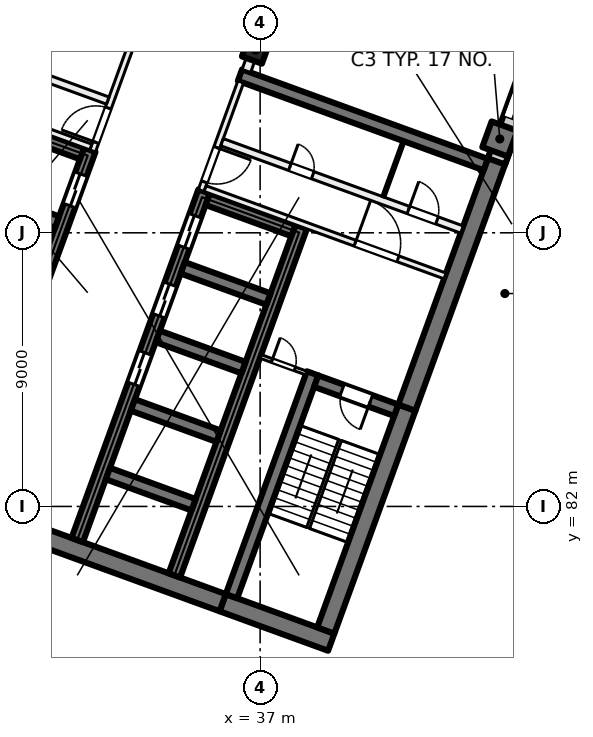
"""IFC4 building model, lengths in metres.
Left out: names, types, materials, properties, quantities, classifications, styles, units other than length and angle.
Written with IfcOpenShell. Run it as: python <this file> out.ifc"""

import sys

from ifc_helpers import new_model, si_unit, direction, frame, frame_2d, origin, origin_2d, place, context, subcontext, project, spatial, rectangle, extrude, element, fill, save


model = new_model("IFC4")
c1 = context("Model", 3, precision=1e-05, world=origin(), true_north=direction((0.0, 1.0)))
c2 = subcontext(c1, "Body", "Model", "MODEL_VIEW")
j1 = project(units=[si_unit("LENGTHUNIT", "METRE"), si_unit("PLANEANGLEUNIT", "RADIAN")], contexts=[c1])
p1 = place(None, origin())
s1 = spatial("IfcSite", under=j1, at=p1, CompositionType="ELEMENT")
p2 = place(p1, origin())
s2 = spatial("IfcBuilding", under=s1, at=p2, CompositionType="ELEMENT")
p3 = place(p2, frame((0.0, 0.0, 59.5)))
s3 = spatial("IfcBuildingStorey", under=s2, at=p3, CompositionType="ELEMENT", Elevation=59.5)
p4 = place(p3, frame((36.849, 97.011, 0.0), z_axis=(0.0, 0.0, 1.0), x_axis=(-0.342020143326, -0.939692620786, 0.0)))
e1 = element("IfcColumn", 1, at=p4, inside=s3, PredefinedType="COLUMN", context=c2, shape_type="SweptSolid", body=[
    extrude(rectangle(XDim=0.7, YDim=0.7, at=origin_2d()), origin(), (0.0, 0.0, 1.0), 4.0),
])
p5 = place(p3, frame((44.884, 94.087, 0.0), z_axis=(0.0, 0.0, 1.0), x_axis=(-0.342020143326, -0.939692620786, 0.0)))
e2 = element("IfcColumn", 2, at=p5, inside=s3, PredefinedType="COLUMN", context=c2, shape_type="SweptSolid", body=[
    extrude(rectangle(XDim=0.9, YDim=0.9, at=origin_2d()), origin(), (0.0, 0.0, 1.0), 4.0),
])
p6 = place(p3, frame((39.338, 77.535, 0.0), z_axis=(0.0, 0.0, 1.0), x_axis=(-0.939701471648, 0.341995824804, 0.0)))
e3 = element("IfcWall", 3, at=p6, inside=s3, PredefinedType="SHEAR", context=c2, shape_type="SweptSolid", body=[
    extrude(rectangle(XDim=3.8, YDim=0.6, at=frame_2d((1.9, 0.0))), origin(), (0.0, 0.0, 1.0), 4.0),
])
p7 = place(p3, frame((35.767, 78.835, 0.0), z_axis=(0.0, 0.0, 1.0), x_axis=(-0.939692894512, 0.342019391267, 0.0)))
e4 = element("IfcWall", 4, at=p7, inside=s3, PredefinedType="SHEAR", context=c2, shape_type="SweptSolid", body=[
    extrude(rectangle(XDim=14.4, YDim=0.6, at=frame_2d((7.2, 0.0))), origin(), (0.0, 0.0, 1.0), 4.0),
])
p8 = place(p3, frame((39.159, 77.92, 0.0), z_axis=(0.0, 0.0, 1.0), x_axis=(0.342016982193, 0.939693771338, 0.0)))
e5 = element("IfcWall", 5, at=p8, inside=s3, PredefinedType="SHEAR", context=c2, shape_type="SweptSolid", body=[
    extrude(rectangle(XDim=7.8, YDim=0.6, at=frame_2d((3.9, 0.0))), origin(), (0.0, 0.0, 1.0), 4.0),
])
p9 = place(p3, frame((41.827, 85.249, 0.0), z_axis=(0.0, 0.0, 1.0), x_axis=(0.342016162452, 0.939694069696, 0.0)))
e6 = element("IfcWall", 6, at=p9, inside=s3, PredefinedType="SHEAR", context=c2, shape_type="SweptSolid", body=[
    extrude(rectangle(XDim=8.9, YDim=0.6, at=frame_2d((4.45, 0.0))), origin(), (0.0, 0.0, 1.0), 4.0),
])
p10 = place(p3, frame((36.058, 79.048, 0.0), z_axis=(0.0, 0.0, 1.0), x_axis=(0.342016982193, 0.939693771338, 0.0)))
e7 = element("IfcWall", 7, at=p10, inside=s3, PredefinedType="SHEAR", context=c2, shape_type="SweptSolid", body=[
    extrude(rectangle(XDim=7.8, YDim=0.4, at=frame_2d((3.9, 0.0))), origin(), (0.0, 0.0, 1.0), 4.0),
])
p11 = place(p3, frame((41.476, 85.164, 0.0), z_axis=(0.0, 0.0, 1.0), x_axis=(-0.939678810556, 0.342058084236, 0.0)))
e8 = element("IfcWall", 8, at=p11, inside=s3, PredefinedType="SHEAR", context=c2, shape_type="SweptSolid", body=[
    extrude(rectangle(XDim=2.8, YDim=0.4, at=frame_2d((1.4, 0.0))), origin(), (0.0, 0.0, 1.0), 4.0),
])
p12 = place(p11, frame((0.9, 0.0, 0.0)))
e9 = element("IfcOpeningElement", 9, at=p12, cuts=e8, PredefinedType="OPENING", context=c2, shape_type="SweptSolid", body=[
    extrude(rectangle(XDim=1.0, YDim=2.1, at=frame_2d((0.5, 1.05))), frame((0.0, 0.21, 0.0), z_axis=(0.0, -1.0, 0.0), x_axis=(1.0, 0.0, 0.0)), (0.0, 0.0, 1.0), 0.42),
])
p13 = place(p3, frame((30.984, 80.895, 0.0), z_axis=(0.0, 0.0, 1.0), x_axis=(0.342021021735, 0.939692301071, 0.0)))
e10 = element("IfcWall", 10, at=p13, inside=s3, PredefinedType="SHEAR", context=c2, shape_type="SweptSolid", body=[
    extrude(rectangle(XDim=12.2, YDim=0.4, at=frame_2d((6.1, 0.0))), origin(), (0.0, 0.0, 1.0), 4.0),
])
p14 = place(p13, frame((5.45, 0.0, 0.0)))
e11 = element("IfcOpeningElement", 11, at=p14, cuts=e10, PredefinedType="OPENING", context=c2, shape_type="SweptSolid", body=[
    extrude(rectangle(XDim=1.1, YDim=2.1, at=frame_2d((0.55, 1.05))), frame((0.0, 0.21, 0.0), z_axis=(0.0, -1.0, 0.0), x_axis=(1.0, 0.0, 0.0)), (0.0, 0.0, 1.0), 0.42),
])
p15 = place(p13, frame((7.85, 0.0, 0.0)))
e12 = element("IfcOpeningElement", 12, at=p15, cuts=e10, PredefinedType="OPENING", context=c2, shape_type="SweptSolid", body=[
    extrude(rectangle(XDim=1.1, YDim=2.1, at=frame_2d((0.55, 1.05))), frame((0.0, 0.21, 0.0), z_axis=(0.0, -1.0, 0.0), x_axis=(1.0, 0.0, 0.0)), (0.0, 0.0, 1.0), 0.42),
])
p16 = place(p13, frame((10.25, 0.0, 0.0)))
e13 = element("IfcOpeningElement", 13, at=p16, cuts=e10, PredefinedType="OPENING", context=c2, shape_type="SweptSolid", body=[
    extrude(rectangle(XDim=1.1, YDim=2.1, at=frame_2d((0.55, 1.05))), frame((0.0, 0.21, 0.0), z_axis=(0.0, -1.0, 0.0), x_axis=(1.0, 0.0, 0.0)), (0.0, 0.0, 1.0), 0.42),
])
p17 = place(p3, frame((34.178, 79.732, 0.0), z_axis=(0.0, 0.0, 1.0), x_axis=(0.342014590177, 0.939694641948, 0.0)))
e14 = element("IfcWall", 14, at=p17, inside=s3, PredefinedType="SHEAR", context=c2, shape_type="SweptSolid", body=[
    extrude(rectangle(XDim=12.2, YDim=0.4, at=frame_2d((6.1, 0.0))), origin(), (0.0, 0.0, 1.0), 4.0),
])
for number, where, z_axis, x_axis in (
    (15, (34.812, 82.056, 0.0), (0.0, 0.0, 1.0), (-0.94, 0.342, 0.0)),
    (16, (35.632, 84.311, 0.0), (0.0, 0.0, 1.0), (-0.94, 0.342, 0.0)),
    (17, (36.453, 86.566, 0.0), (0.0, 0.0, 1.0), (-0.94, 0.342, 0.0)),
    (18, (37.274, 88.822, 0.0), (0.0, 0.0, 1.0), (-0.94, 0.342, 0.0)),
):
    element("IfcWall", number, at=place(p3, frame(where, z_axis=z_axis, x_axis=x_axis)), inside=s3, PredefinedType="SHEAR", context=c2, shape_type="SweptSolid", body=[
        extrude(rectangle(XDim=3.0, YDim=0.4, at=frame_2d((1.5, 0.0))), origin(), (0.0, 0.0, 1.0), 4.0),
    ])
p18 = place(p3, frame((38.095, 91.077, 0.0), z_axis=(0.0, 0.0, 1.0), x_axis=(-0.939676934218, 0.342063238742, 0.0)))
e19 = element("IfcWall", 19, at=p18, inside=s3, PredefinedType="SHEAR", context=c2, shape_type="SweptSolid", body=[
    extrude(rectangle(XDim=3.0, YDim=0.4, at=frame_2d((1.5, 0.0))), origin(), (0.0, 0.0, 1.0), 4.0),
])
p19 = place(p3, frame((27.225, 82.263, 0.0), z_axis=(0.0, 0.0, 1.0), x_axis=(0.342014590177, 0.939694641948, 0.0)))
e20 = element("IfcWall", 20, at=p19, inside=s3, PredefinedType="SHEAR", context=c2, shape_type="SweptSolid", body=[
    extrude(rectangle(XDim=12.2, YDim=0.4, at=frame_2d((6.1, 0.0))), origin(), (0.0, 0.0, 1.0), 4.0),
])
p20 = place(p19, frame((10.25, 0.0, 0.0)))
e21 = element("IfcOpeningElement", 21, at=p20, cuts=e20, PredefinedType="OPENING", context=c2, shape_type="SweptSolid", body=[
    extrude(rectangle(XDim=1.1, YDim=2.1, at=frame_2d((0.55, 1.05))), frame((0.0, 0.21, 0.0), z_axis=(0.0, -1.0, 0.0), x_axis=(1.0, 0.0, 0.0)), (0.0, 0.0, 1.0), 0.42),
])
p21 = place(p19, frame((0.7, 0.0, 0.0)))
e22 = element("IfcOpeningElement", 22, at=p21, cuts=e20, PredefinedType="OPENING", context=c2, shape_type="SweptSolid", body=[
    extrude(rectangle(XDim=0.8, YDim=2.1, at=frame_2d((0.4, 1.05))), frame((0.0, 0.21, 0.0), z_axis=(0.0, -1.0, 0.0), x_axis=(1.0, 0.0, 0.0)), (0.0, 0.0, 1.0), 0.42),
])
for number, where, z_axis, x_axis in (
    (23, (30.32, 91.353, 0.0), (0.0, 0.0, 1.0), (-0.94, 0.342, 0.0)),
    (24, (31.141, 93.608, 0.0), (0.0, 0.0, 1.0), (-0.94, 0.342, 0.0)),
):
    element("IfcWall", number, at=place(p3, frame(where, z_axis=z_axis, x_axis=x_axis)), inside=s3, PredefinedType="SHEAR", context=c2, shape_type="SweptSolid", body=[
        extrude(rectangle(XDim=3.0, YDim=0.4, at=frame_2d((1.5, 0.0))), origin(), (0.0, 0.0, 1.0), 4.0),
    ])
p22 = place(p3, frame((44.418, 93.245, 0.0), z_axis=(0.0, 0.0, 1.0), x_axis=(-0.93969060187, 0.342025690201, 0.0)))
e25 = element("IfcWall", 25, at=p22, inside=s3, PredefinedType="SHEAR", context=c2, shape_type="SweptSolid", body=[
    extrude(rectangle(XDim=8.6, YDim=0.4, at=frame_2d((4.3, 0.0))), origin(), (0.0, 0.0, 1.0), 4.0),
])
p23 = place(p3, frame((52.212, 113.783, 0.0), z_axis=(0.0, 0.0, 1.0), x_axis=(-0.34202521188, -0.939690775968, 0.0)))
e26 = element("IfcWall", 26, at=p23, inside=s3, PredefinedType="SOLIDWALL", context=c2, shape_type="SweptSolid", body=[
    extrude(rectangle(XDim=21.745, YDim=0.6, at=frame_2d((10.873, 0.0))), origin(), (0.0, 0.0, 1.0), 3.625),
])
p24 = place(p23, frame((3.765, 0.0, 0.9)))
e27 = element("IfcOpeningElement", 27, at=p24, cuts=e26, PredefinedType="OPENING", context=c2, shape_type="SweptSolid", body=[
    extrude(rectangle(XDim=3.0, YDim=2.4, at=frame_2d((1.5, 1.2))), frame((0.0, 0.31, 0.0), z_axis=(0.0, -1.0, 0.0), x_axis=(1.0, 0.0, 0.0)), (0.0, 0.0, 1.0), 0.62),
])
p25 = place(p23, frame((8.265, 0.0, 0.9)))
e28 = element("IfcOpeningElement", 28, at=p25, cuts=e26, PredefinedType="OPENING", context=c2, shape_type="SweptSolid", body=[
    extrude(rectangle(XDim=3.0, YDim=2.4, at=frame_2d((1.5, 1.2))), frame((0.0, 0.31, 0.0), z_axis=(0.0, -1.0, 0.0), x_axis=(1.0, 0.0, 0.0)), (0.0, 0.0, 1.0), 0.62),
])
p26 = place(p23, frame((12.765, 0.0, 0.9)))
e29 = element("IfcOpeningElement", 29, at=p26, cuts=e26, PredefinedType="OPENING", context=c2, shape_type="SweptSolid", body=[
    extrude(rectangle(XDim=3.0, YDim=2.4, at=frame_2d((1.5, 1.2))), frame((0.0, 0.31, 0.0), z_axis=(0.0, -1.0, 0.0), x_axis=(1.0, 0.0, 0.0)), (0.0, 0.0, 1.0), 0.62),
])
p27 = place(p23, frame((17.265, 0.0, 0.9)))
e30 = element("IfcOpeningElement", 30, at=p27, cuts=e26, PredefinedType="OPENING", context=c2, shape_type="SweptSolid", body=[
    extrude(rectangle(XDim=3.0, YDim=2.4, at=frame_2d((1.5, 1.2))), frame((0.0, 0.31, 0.0), z_axis=(0.0, -1.0, 0.0), x_axis=(1.0, 0.0, 0.0)), (0.0, 0.0, 1.0), 0.62),
])
p28 = place(p3, frame((31.491, 93.693, 0.0), z_axis=(0.0, 0.0, 1.0), x_axis=(0.341995824804, 0.939701471648, 0.0)))
e31 = element("IfcWall", 31, at=p28, inside=s3, PredefinedType="PARTITIONING", context=c2, shape_type="SweptSolid", body=[
    extrude(rectangle(XDim=3.8, YDim=0.2, at=frame_2d((1.9, 0.0))), origin(), (0.0, 0.0, 1.0), 3.625),
])
p29 = place(p28, frame((0.3, 0.0, 0.0)))
e32 = element("IfcOpeningElement", 32, at=p29, cuts=e31, PredefinedType="OPENING", context=c2, shape_type="SweptSolid", body=[
    extrude(rectangle(XDim=1.2, YDim=2.1, at=frame_2d((0.6, 1.05))), frame((0.0, 0.11, 0.0), z_axis=(0.0, -1.0, 0.0), x_axis=(1.0, 0.0, 0.0)), (0.0, 0.0, 1.0), 0.22),
])
p30 = place(p3, frame((23.538, 96.694, 0.0), z_axis=(0.0, 0.0, 1.0), x_axis=(0.939691552312, -0.342023078919, 0.0)))
e33 = element("IfcWall", 33, at=p30, inside=s3, PredefinedType="PARTITIONING", context=c2, shape_type="SweptSolid", body=[
    extrude(rectangle(XDim=8.4, YDim=0.2, at=frame_2d((4.2, 0.0))), origin(), (0.0, 0.0, 1.0), 3.625),
])
p31 = place(p30, frame((1.65, 0.0, 0.0)))
e34 = element("IfcOpeningElement", 34, at=p31, cuts=e33, PredefinedType="OPENING", context=c2, shape_type="SweptSolid", body=[
    extrude(rectangle(XDim=1.5, YDim=2.1, at=frame_2d((0.75, 1.05))), frame((0.0, 0.11, 0.0), z_axis=(0.0, -1.0, 0.0), x_axis=(1.0, 0.0, 0.0)), (0.0, 0.0, 1.0), 0.22),
])
p32 = place(p3, frame((24.094, 98.221, 0.0), z_axis=(0.0, 0.0, 1.0), x_axis=(0.939691552312, -0.342023078919, 0.0)))
e35 = element("IfcWall", 35, at=p32, inside=s3, PredefinedType="PARTITIONING", context=c2, shape_type="SweptSolid", body=[
    extrude(rectangle(XDim=8.4, YDim=0.25, at=frame_2d((4.2, 0.0))), origin(), (0.0, 0.0, 1.0), 3.625),
])
p33 = place(p32, frame((3.7, 0.0, 0.0)))
e36 = element("IfcOpeningElement", 36, at=p33, cuts=e35, PredefinedType="OPENING", context=c2, shape_type="SweptSolid", body=[
    extrude(rectangle(XDim=1.0, YDim=2.1, at=frame_2d((0.5, 1.05))), frame((0.0, 0.135, 0.0), z_axis=(0.0, -1.0, 0.0), x_axis=(1.0, 0.0, 0.0)), (0.0, 0.0, 1.0), 0.27),
])
p34 = place(p3, frame((36.362, 95.964, 0.0), z_axis=(0.0, 0.0, 1.0), x_axis=(-0.341995824804, -0.939701471648, 0.0)))
e37 = element("IfcWall", 37, at=p34, inside=s3, PredefinedType="PARTITIONING", context=c2, shape_type="SweptSolid", body=[
    extrude(rectangle(XDim=3.8, YDim=0.2, at=frame_2d((1.9, 0.0))), origin(), (0.0, 0.0, 1.0), 3.625),
])
p35 = place(p34, frame((2.3, 0.0, 0.0)))
e38 = element("IfcOpeningElement", 38, at=p35, cuts=e37, PredefinedType="OPENING", context=c2, shape_type="SweptSolid", body=[
    extrude(rectangle(XDim=1.2, YDim=2.1, at=frame_2d((0.6, 1.05))), frame((0.0, 0.11, 0.0), z_axis=(0.0, -1.0, 0.0), x_axis=(1.0, 0.0, 0.0)), (0.0, 0.0, 1.0), 0.22),
])
p36 = place(p3, frame((35.19, 92.453, 0.0), z_axis=(0.0, 0.0, 1.0), x_axis=(0.939691552312, -0.342023078919, 0.0)))
e39 = element("IfcWall", 39, at=p36, inside=s3, PredefinedType="PARTITIONING", context=c2, shape_type="SweptSolid", body=[
    extrude(rectangle(XDim=8.4, YDim=0.2, at=frame_2d((4.2, 0.0))), origin(), (0.0, 0.0, 1.0), 3.625),
])
p37 = place(p36, frame((5.25, 0.0, 0.0)))
e40 = element("IfcOpeningElement", 40, at=p37, cuts=e39, PredefinedType="OPENING", context=c2, shape_type="SweptSolid", body=[
    extrude(rectangle(XDim=1.5, YDim=2.1, at=frame_2d((0.75, 1.05))), frame((0.0, 0.11, 0.0), z_axis=(0.0, -1.0, 0.0), x_axis=(1.0, 0.0, 0.0)), (0.0, 0.0, 1.0), 0.22),
])
p38 = place(p3, frame((35.746, 93.98, 0.0), z_axis=(0.0, 0.0, 1.0), x_axis=(0.939691552312, -0.342023078919, 0.0)))
e41 = element("IfcWall", 41, at=p38, inside=s3, PredefinedType="PARTITIONING", context=c2, shape_type="SweptSolid", body=[
    extrude(rectangle(XDim=8.4, YDim=0.25, at=frame_2d((4.2, 0.0))), origin(), (0.0, 0.0, 1.0), 3.625),
])
p39 = place(p38, frame((2.375, 0.0, 0.0)))
e42 = element("IfcOpeningElement", 42, at=p39, cuts=e41, PredefinedType="OPENING", context=c2, shape_type="SweptSolid", body=[
    extrude(rectangle(XDim=0.8, YDim=2.1, at=frame_2d((0.4, 1.05))), frame((0.0, 0.135, 0.0), z_axis=(0.0, -1.0, 0.0), x_axis=(1.0, 0.0, 0.0)), (0.0, 0.0, 1.0), 0.27),
])
p40 = place(p38, frame((6.525, 0.0, 0.0)))
e43 = element("IfcOpeningElement", 43, at=p40, cuts=e41, PredefinedType="OPENING", context=c2, shape_type="SweptSolid", body=[
    extrude(rectangle(XDim=1.0, YDim=2.1, at=frame_2d((0.5, 1.05))), frame((0.0, 0.135, 0.0), z_axis=(0.0, -1.0, 0.0), x_axis=(1.0, 0.0, 0.0)), (0.0, 0.0, 1.0), 0.27),
])
p41 = place(p3, frame((37.013, 86.935, 0.0), z_axis=(0.0, 0.0, 1.0), x_axis=(0.939659694648, -0.342110593602, 0.0)))
e44 = element("IfcWall", 44, at=p41, inside=s3, PredefinedType="PARTITIONING", context=c2, shape_type="SweptSolid", body=[
    extrude(rectangle(XDim=1.6, YDim=0.125, at=frame_2d((0.8, 0.0))), origin(), (0.0, 0.0, 1.0), 3.625),
])
p42 = place(p41, frame((0.4, 0.0, 0.0)))
e45 = element("IfcOpeningElement", 45, at=p42, cuts=e44, PredefinedType="OPENING", context=c2, shape_type="SweptSolid", body=[
    extrude(rectangle(XDim=0.8, YDim=2.1, at=frame_2d((0.4, 1.05))), frame((0.0, 0.073, 0.0), z_axis=(0.0, -1.0, 0.0), x_axis=(1.0, 0.0, 0.0)), (0.0, 0.0, 1.0), 0.145),
])
p43 = place(p3, frame((41.718, 94.015, 0.0), z_axis=(0.0, 0.0, 1.0), x_axis=(-0.342064742067, -0.939676386973, 0.0)))
e46 = element("IfcWall", 46, at=p43, inside=s3, PredefinedType="PARTITIONING", context=c2, shape_type="SweptSolid", body=[
    extrude(rectangle(XDim=1.95, YDim=0.1, at=frame_2d((0.975, 0.0))), origin(), (0.0, 0.0, 1.0), 3.625),
])
p44 = place(p3, frame((47.314, 125.909, 0.0), z_axis=(0.0, 0.0, 1.0), x_axis=(-0.342010770371, -0.939696032209, 0.0)))
e47 = element("IfcWall", 47, at=p44, inside=s3, PredefinedType="PARTITIONING", context=c2, shape_type="SweptSolid", body=[
    extrude(rectangle(XDim=31.485, YDim=0.3, at=frame_2d((15.742, 0.0))), origin(), (0.0, 0.0, 1.0), 3.625),
])
p45 = place(p44, frame((28.359, 0.0, 0.0)))
e48 = element("IfcOpeningElement", 48, at=p45, cuts=e47, PredefinedType="OPENING", context=c2, shape_type="SweptSolid", body=[
    extrude(rectangle(XDim=1.0, YDim=2.1, at=frame_2d((0.5, 1.05))), frame((0.0, 0.16, 0.0), z_axis=(0.0, -1.0, 0.0), x_axis=(1.0, 0.0, 0.0)), (0.0, 0.0, 1.0), 0.32),
])
p46 = place(p44, frame((23.484, 0.0, 0.0)))
e49 = element("IfcOpeningElement", 49, at=p46, cuts=e47, PredefinedType="OPENING", context=c2, shape_type="SweptSolid", body=[
    extrude(rectangle(XDim=1.0, YDim=2.1, at=frame_2d((0.5, 1.05))), frame((0.0, 0.16, 0.0), z_axis=(0.0, -1.0, 0.0), x_axis=(1.0, 0.0, 0.0)), (0.0, 0.0, 1.0), 0.32),
])
p47 = place(p44, frame((13.834, 0.0, 0.0)))
e50 = element("IfcOpeningElement", 50, at=p47, cuts=e47, PredefinedType="OPENING", context=c2, shape_type="SweptSolid", body=[
    extrude(rectangle(XDim=1.8, YDim=2.1, at=frame_2d((0.9, 1.05))), frame((0.0, 0.16, 0.0), z_axis=(0.0, -1.0, 0.0), x_axis=(1.0, 0.0, 0.0)), (0.0, 0.0, 1.0), 0.32),
])
p48 = place(p27, origin())
e51 = element("IfcWindow", 51, at=p48, inside=s3, PartitioningType="SINGLE_PANEL", PredefinedType="WINDOW", context=c2, shape_type="SweptSolid", body=[
    extrude(rectangle(XDim=3.0, YDim=2.4, at=frame_2d((1.5, 1.2))), frame((0.0, 0.03, 0.0), z_axis=(0.0, -1.0, 0.0), x_axis=(1.0, 0.0, 0.0)), (0.0, 0.0, 1.0), 0.06),
])
fill(e30, e51)
p49 = place(p20, origin())
e52 = element("IfcDoor", 52, at=p49, inside=s3, OperationType="DOUBLE_DOOR_SLIDING", PredefinedType="DOOR", context=c2, shape_type="SweptSolid", body=[
    extrude(rectangle(XDim=1.1, YDim=2.1, at=frame_2d((0.55, 1.05))), frame((0.0, 0.025, 0.0), z_axis=(0.0, -1.0, 0.0), x_axis=(1.0, 0.0, 0.0)), (0.0, 0.0, 1.0), 0.05),
])
fill(e21, e52)
p50 = place(p14, origin())
e53 = element("IfcDoor", 53, at=p50, inside=s3, OperationType="DOUBLE_DOOR_SLIDING", PredefinedType="DOOR", context=c2, shape_type="SweptSolid", body=[
    extrude(rectangle(XDim=1.1, YDim=2.1, at=frame_2d((0.55, 1.05))), frame((0.0, 0.025, 0.0), z_axis=(0.0, -1.0, 0.0), x_axis=(1.0, 0.0, 0.0)), (0.0, 0.0, 1.0), 0.05),
])
fill(e11, e53)
p51 = place(p15, origin())
e54 = element("IfcDoor", 54, at=p51, inside=s3, OperationType="DOUBLE_DOOR_SLIDING", PredefinedType="DOOR", context=c2, shape_type="SweptSolid", body=[
    extrude(rectangle(XDim=1.1, YDim=2.1, at=frame_2d((0.55, 1.05))), frame((0.0, 0.025, 0.0), z_axis=(0.0, -1.0, 0.0), x_axis=(1.0, 0.0, 0.0)), (0.0, 0.0, 1.0), 0.05),
])
fill(e12, e54)
p52 = place(p16, origin())
e55 = element("IfcDoor", 55, at=p52, inside=s3, OperationType="DOUBLE_DOOR_SLIDING", PredefinedType="DOOR", context=c2, shape_type="SweptSolid", body=[
    extrude(rectangle(XDim=1.1, YDim=2.1, at=frame_2d((0.55, 1.05))), frame((0.0, 0.025, 0.0), z_axis=(0.0, -1.0, 0.0), x_axis=(1.0, 0.0, 0.0)), (0.0, 0.0, 1.0), 0.05),
])
fill(e13, e55)
p53 = place(p29, origin())
e56 = element("IfcDoor", 56, at=p53, inside=s3, OperationType="DOUBLE_DOOR_SINGLE_SWING", PredefinedType="DOOR", context=c2, shape_type="SweptSolid", body=[
    extrude(rectangle(XDim=1.2, YDim=2.1, at=frame_2d((0.6, 1.05))), frame((0.0, 0.025, 0.0), z_axis=(0.0, -1.0, 0.0), x_axis=(1.0, 0.0, 0.0)), (0.0, 0.0, 1.0), 0.05),
])
fill(e32, e56)
p54 = place(p35, origin())
e57 = element("IfcDoor", 57, at=p54, inside=s3, OperationType="DOUBLE_DOOR_SINGLE_SWING", PredefinedType="DOOR", context=c2, shape_type="SweptSolid", body=[
    extrude(rectangle(XDim=1.2, YDim=2.1, at=frame_2d((0.6, 1.05))), frame((0.0, 0.025, 0.0), z_axis=(0.0, -1.0, 0.0), x_axis=(1.0, 0.0, 0.0)), (0.0, 0.0, 1.0), 0.05),
])
fill(e38, e57)
p55 = place(p37, origin())
e58 = element("IfcDoor", 58, at=p55, inside=s3, OperationType="DOUBLE_DOOR_SINGLE_SWING", PredefinedType="DOOR", context=c2, shape_type="SweptSolid", body=[
    extrude(rectangle(XDim=1.5, YDim=2.1, at=frame_2d((0.75, 1.05))), frame((0.0, 0.025, 0.0), z_axis=(0.0, -1.0, 0.0), x_axis=(1.0, 0.0, 0.0)), (0.0, 0.0, 1.0), 0.05),
])
fill(e40, e58)
p56 = place(p12, origin())
e59 = element("IfcDoor", 59, at=p56, inside=s3, OperationType="SINGLE_SWING_RIGHT", PredefinedType="DOOR", context=c2, shape_type="SweptSolid", body=[
    extrude(rectangle(XDim=1.0, YDim=2.1, at=frame_2d((0.5, 1.05))), frame((0.0, 0.025, 0.0), z_axis=(0.0, -1.0, 0.0), x_axis=(1.0, 0.0, 0.0)), (0.0, 0.0, 1.0), 0.05),
])
fill(e9, e59)
p57 = place(p42, origin())
e60 = element("IfcDoor", 60, at=p57, inside=s3, OperationType="SINGLE_SWING_LEFT", PredefinedType="DOOR", context=c2, shape_type="SweptSolid", body=[
    extrude(rectangle(XDim=0.8, YDim=2.1, at=frame_2d((0.4, 1.05))), frame((0.0, 0.025, 0.0), z_axis=(0.0, -1.0, 0.0), x_axis=(1.0, 0.0, 0.0)), (0.0, 0.0, 1.0), 0.05),
])
fill(e45, e60)
p58 = place(p39, origin())
e61 = element("IfcDoor", 61, at=p58, inside=s3, OperationType="SINGLE_SWING_RIGHT", PredefinedType="DOOR", context=c2, shape_type="SweptSolid", body=[
    extrude(rectangle(XDim=0.8, YDim=2.1, at=frame_2d((0.4, 1.05))), frame((0.0, 0.025, 0.0), z_axis=(0.0, -1.0, 0.0), x_axis=(1.0, 0.0, 0.0)), (0.0, 0.0, 1.0), 0.05),
])
fill(e42, e61)
p59 = place(p40, origin())
e62 = element("IfcDoor", 62, at=p59, inside=s3, OperationType="SINGLE_SWING_LEFT", PredefinedType="DOOR", context=c2, shape_type="SweptSolid", body=[
    extrude(rectangle(XDim=1.0, YDim=2.1, at=frame_2d((0.5, 1.05))), frame((0.0, 0.025, 0.0), z_axis=(0.0, -1.0, 0.0), x_axis=(1.0, 0.0, 0.0)), (0.0, 0.0, 1.0), 0.05),
])
fill(e43, e62)
save(model, sys.argv[1])
